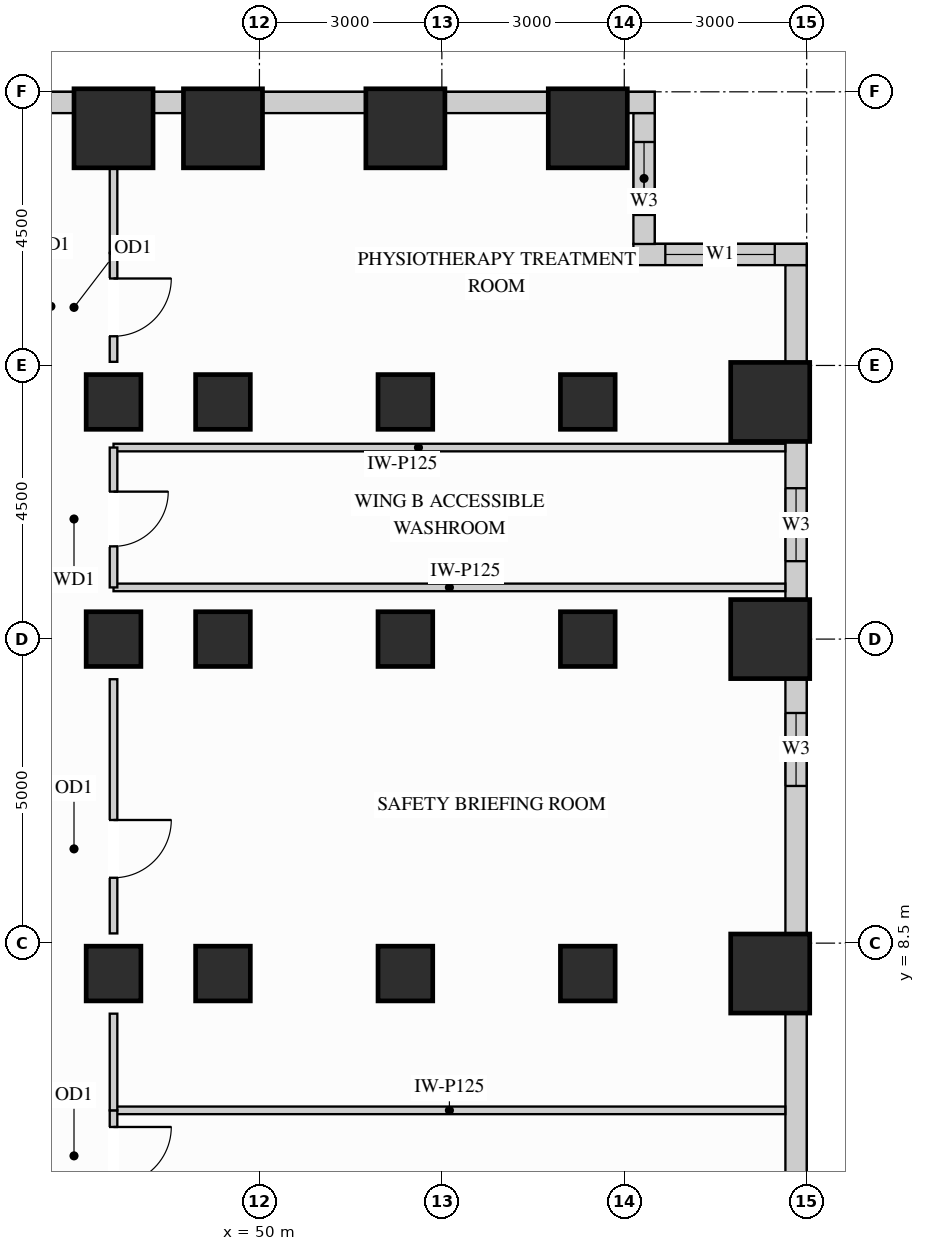
"""IFC4 building model, lengths in metres.
Left out: names, types, materials, properties, quantities, classifications, styles, units other than length and angle.
Written with IfcOpenShell. Run it as: python <this file> out.ifc"""

import sys

from ifc_helpers import new_model, si_unit, direction, frame, frame_2d, origin, origin_2d, place, context, subcontext, project, spatial, rectangle, extrude, source, transform, mapped, element, fill, save


model = new_model("IFC4")
c1 = context("Model", 3, precision=1e-05, world=origin(), true_north=direction((0.0, 1.0)))
c2 = subcontext(c1, "Body", "Model", "MODEL_VIEW")
j1 = project(units=[si_unit("LENGTHUNIT", "METRE"), si_unit("PLANEANGLEUNIT", "RADIAN")], contexts=[c1])
p1 = place(None, origin())
s1 = spatial("IfcSite", under=j1, at=p1, CompositionType="ELEMENT")
p2 = place(p1, origin())
s2 = spatial("IfcBuilding", under=s1, at=p2, CompositionType="ELEMENT")
p3 = place(p2, frame((0.0, 0.0, 33.3)))
s3 = spatial("IfcBuildingStorey", under=s2, at=p3, CompositionType="ELEMENT", Elevation=33.3)
m1 = source(origin(), c2, "Body", "SweptSolid", [
    extrude(rectangle(XDim=0.9, YDim=0.9, at=origin_2d()), origin(), (0.0, 0.0, 1.0), 3.38),
])
for number, where, z_axis, x_axis in (
    (1, (47.6, 13.5, 0.0), (0.0, 0.0, 1.0), (1.0, 0.0, 0.0)),
    (2, (47.6, 8.0, 0.0), (0.0, 0.0, 1.0), (1.0, 0.0, 0.0)),
    (3, (47.6, 17.4, 0.0), (0.0, 0.0, 1.0), (1.0, 0.0, 0.0)),
    (4, (49.4, 13.5, 0.0), (0.0, 0.0, 1.0), (1.0, 0.0, 0.0)),
    (5, (49.4, 17.4, 0.0), (0.0, 0.0, 1.0), (1.0, 0.0, 0.0)),
    (6, (49.4, 8.0, 0.0), (0.0, 0.0, 1.0), (1.0, 0.0, 0.0)),
    (7, (52.4, 13.5, 0.0), (0.0, 0.0, 1.0), (1.0, 0.0, 0.0)),
    (8, (52.4, 17.4, 0.0), (0.0, 0.0, 1.0), (1.0, 0.0, 0.0)),
    (9, (52.4, 8.0, 0.0), (0.0, 0.0, 1.0), (1.0, 0.0, 0.0)),
    (10, (55.4, 13.5, 0.0), (0.0, 0.0, 1.0), (1.0, 0.0, 0.0)),
    (11, (55.4, 17.4, 0.0), (0.0, 0.0, 1.0), (1.0, 0.0, 0.0)),
    (12, (55.4, 8.0, 0.0), (0.0, 0.0, 1.0), (1.0, 0.0, 0.0)),
):
    element("IfcColumn", number, at=place(p3, frame(where, z_axis=z_axis, x_axis=x_axis)), inside=s3, PredefinedType="COLUMN", context=c2, shape_type="MappedRepresentation", body=[
        mapped(m1, transform((0.0, 0.0, 0.0), x_axis=(1.0, 0.0, 0.0), y_axis=(0.0, 1.0, 0.0), z_axis=(0.0, 0.0, 1.0))),
    ])
m2 = source(origin(), c2, "Body", "SweptSolid", [
    extrude(rectangle(XDim=1.3, YDim=1.3, at=origin_2d()), origin(), (0.0, 0.0, 1.0), 3.38),
])
for number, where, z_axis, x_axis in (
    (13, (47.6, 21.9, 0.0), (0.0, 0.0, 1.0), (1.0, 0.0, 0.0)),
    (14, (49.4, 21.9, 0.0), (0.0, 0.0, 1.0), (1.0, 0.0, 0.0)),
    (15, (52.4, 21.9, 0.0), (0.0, 0.0, 1.0), (1.0, 0.0, 0.0)),
    (16, (55.4, 21.9, 0.0), (0.0, 0.0, 1.0), (1.0, 0.0, 0.0)),
    (17, (58.4, 13.5, 0.0), (0.0, 0.0, 1.0), (1.0, 0.0, 0.0)),
    (18, (58.4, 17.4, 0.0), (0.0, 0.0, 1.0), (1.0, 0.0, 0.0)),
    (19, (58.4, 8.0, 0.0), (0.0, 0.0, 1.0), (1.0, 0.0, 0.0)),
):
    element("IfcColumn", number, at=place(p3, frame(where, z_axis=z_axis, x_axis=x_axis)), inside=s3, PredefinedType="COLUMN", context=c2, shape_type="MappedRepresentation", body=[
        mapped(m2, transform((0.0, 0.0, 0.0), x_axis=(1.0, 0.0, 0.0), y_axis=(0.0, 1.0, 0.0), z_axis=(0.0, 0.0, 1.0))),
    ])
m3 = source(origin(), c2, "Body", "SweptSolid", [
    extrude(rectangle(XDim=3.204, YDim=0.35, at=frame_2d((1.602, 0.0))), origin(), (0.0, 0.0, 1.0), 2.51),
])
p4 = place(p3, frame((58.825, 4.148, 0.0), z_axis=(0.0, 0.0, 1.0), x_axis=(0.0, 1.0, 0.0)))
e20 = element("IfcWall", 20, at=p4, inside=s3, PredefinedType="SOLIDWALL", context=c2, shape_type="MappedRepresentation", body=[
    mapped(m3, transform((0.0, 0.0, 0.0), x_axis=(1.0, 0.0, 0.0), y_axis=(0.0, 1.0, 0.0), z_axis=(0.0, 0.0, 1.0))),
])
p5 = place(p3, frame((58.825, 8.648, 0.0), z_axis=(0.0, 0.0, 1.0), x_axis=(0.0, 1.0, 0.0)))
e21 = element("IfcWall", 21, at=p5, inside=s3, PredefinedType="SOLIDWALL", context=c2, shape_type="SweptSolid", body=[
    extrude(rectangle(XDim=4.204, YDim=0.35, at=frame_2d((2.102, 0.0))), origin(), (0.0, 0.0, 1.0), 2.51),
])
p6 = place(p5, frame((2.437, 0.0, 0.78)))
e22 = element("IfcOpeningElement", 22, at=p6, cuts=e21, PredefinedType="OPENING", context=c2, shape_type="SweptSolid", body=[
    extrude(rectangle(XDim=1.2, YDim=1.55, at=frame_2d((0.6, 0.775))), frame((0.0, 0.185, 0.0), z_axis=(0.0, -1.0, 0.0), x_axis=(1.0, 0.0, 0.0)), (0.0, 0.0, 1.0), 0.37),
])
p7 = place(p3, frame((58.825, 14.148, 0.0), z_axis=(0.0, 0.0, 1.0), x_axis=(0.0, 1.0, 0.0)))
e23 = element("IfcWall", 23, at=p7, inside=s3, PredefinedType="SOLIDWALL", context=c2, shape_type="SweptSolid", body=[
    extrude(rectangle(XDim=2.604, YDim=0.35, at=frame_2d((1.302, 0.0))), origin(), (0.0, 0.0, 1.0), 2.51),
])
p8 = place(p7, frame((0.633, 0.0, 0.78)))
e24 = element("IfcOpeningElement", 24, at=p8, cuts=e23, PredefinedType="OPENING", context=c2, shape_type="SweptSolid", body=[
    extrude(rectangle(XDim=1.2, YDim=1.55, at=frame_2d((0.6, 0.775))), frame((0.0, 0.185, 0.0), z_axis=(0.0, -1.0, 0.0), x_axis=(1.0, 0.0, 0.0)), (0.0, 0.0, 1.0), 0.37),
])
m4 = source(origin(), c2, "Body", "SweptSolid", [
    extrude(rectangle(XDim=1.604, YDim=0.35, at=frame_2d((0.802, 0.0))), origin(), (0.0, 0.0, 1.0), 3.365),
])
p9 = place(p3, frame((58.825, 18.048, 0.0), z_axis=(0.0, 0.0, 1.0), x_axis=(0.0, 1.0, 0.0)))
e25 = element("IfcWall", 25, at=p9, inside=s3, PredefinedType="SOLIDWALL", context=c2, shape_type="MappedRepresentation", body=[
    mapped(m4, transform((0.0, 0.0, 0.0), x_axis=(1.0, 0.0, 0.0), y_axis=(0.0, 1.0, 0.0), z_axis=(0.0, 0.0, 1.0))),
])
p10 = place(p3, frame((59.0, 19.825, 0.0), z_axis=(0.0, 0.0, 1.0), x_axis=(-1.0, 0.0, 0.0)))
e26 = element("IfcWall", 26, at=p10, inside=s3, PredefinedType="SOLIDWALL", context=c2, shape_type="SweptSolid", body=[
    extrude(rectangle(XDim=2.85, YDim=0.35, at=frame_2d((1.425, 0.0))), origin(), (0.0, 0.0, 1.0), 3.365),
])
p11 = place(p10, frame((0.525, 0.0, 0.78)))
e27 = element("IfcOpeningElement", 27, at=p11, cuts=e26, PredefinedType="OPENING", context=c2, shape_type="SweptSolid", body=[
    extrude(rectangle(XDim=1.8, YDim=2.1, at=frame_2d((0.9, 1.05))), frame((0.0, 0.185, 0.0), z_axis=(0.0, -1.0, 0.0), x_axis=(1.0, 0.0, 0.0)), (0.0, 0.0, 1.0), 0.37),
])
p12 = place(p3, frame((56.325, 19.998, 0.0), z_axis=(0.0, 0.0, 1.0), x_axis=(0.0, 1.0, 0.0)))
e28 = element("IfcWall", 28, at=p12, inside=s3, PredefinedType="SOLIDWALL", context=c2, shape_type="SweptSolid", body=[
    extrude(rectangle(XDim=2.154, YDim=0.35, at=frame_2d((1.077, 0.0))), origin(), (0.0, 0.0, 1.0), 3.365),
])
p13 = place(p12, frame((0.477, 0.0, 0.78)))
e29 = element("IfcOpeningElement", 29, at=p13, cuts=e28, PredefinedType="OPENING", context=c2, shape_type="SweptSolid", body=[
    extrude(rectangle(XDim=1.2, YDim=2.1, at=frame_2d((0.6, 1.05))), frame((0.0, 0.185, 0.0), z_axis=(0.0, -1.0, 0.0), x_axis=(1.0, 0.0, 0.0)), (0.0, 0.0, 1.0), 0.37),
])
m5 = source(origin(), c2, "Body", "SweptSolid", [
    extrude(rectangle(XDim=0.452, YDim=0.35, at=frame_2d((0.226, 0.0))), origin(), (0.0, 0.0, 1.0), 3.365),
])
p14 = place(p3, frame((56.5, 22.325, 0.0), z_axis=(0.0, 0.0, 1.0), x_axis=(-1.0, 0.0, 0.0)))
e30 = element("IfcWall", 30, at=p14, inside=s3, PredefinedType="SOLIDWALL", context=c2, shape_type="MappedRepresentation", body=[
    mapped(m5, transform((0.0, 0.0, 0.0), x_axis=(1.0, 0.0, 0.0), y_axis=(0.0, 1.0, 0.0), z_axis=(0.0, 0.0, 1.0))),
])
m6 = source(origin(), c2, "Body", "SweptSolid", [
    extrude(rectangle(XDim=1.704, YDim=0.35, at=frame_2d((0.852, 0.0))), origin(), (0.0, 0.0, 1.0), 2.51),
])
for number, where, z_axis, x_axis in (
    (31, (54.752, 22.325, 0.0), (0.0, 0.0, 1.0), (-1.0, 0.0, 0.0)),
    (32, (51.752, 22.325, 0.0), (0.0, 0.0, 1.0), (-1.0, 0.0, 0.0)),
):
    element("IfcWall", number, at=place(p3, frame(where, z_axis=z_axis, x_axis=x_axis)), inside=s3, PredefinedType="SOLIDWALL", context=c2, shape_type="MappedRepresentation", body=[
        mapped(m6, transform((0.0, 0.0, 0.0), x_axis=(1.0, 0.0, 0.0), y_axis=(0.0, 1.0, 0.0), z_axis=(0.0, 0.0, 1.0))),
    ])
m7 = source(origin(), c2, "Body", "SweptSolid", [
    extrude(rectangle(XDim=0.504, YDim=0.35, at=frame_2d((0.252, 0.0))), origin(), (0.0, 0.0, 1.0), 3.365),
])
p15 = place(p3, frame((48.752, 22.325, 0.0), z_axis=(0.0, 0.0, 1.0), x_axis=(-1.0, 0.0, 0.0)))
e33 = element("IfcWall", 33, at=p15, inside=s3, PredefinedType="SOLIDWALL", context=c2, shape_type="MappedRepresentation", body=[
    mapped(m7, transform((0.0, 0.0, 0.0), x_axis=(1.0, 0.0, 0.0), y_axis=(0.0, 1.0, 0.0), z_axis=(0.0, 0.0, 1.0))),
])
p16 = place(p3, frame((46.952, 22.325, 0.0), z_axis=(0.0, 0.0, 1.0), x_axis=(-1.0, 0.0, 0.0)))
e34 = element("IfcWall", 34, at=p16, inside=s3, PredefinedType="SOLIDWALL", context=c2, shape_type="SweptSolid", body=[
    extrude(rectangle(XDim=6.304, YDim=0.35, at=frame_2d((3.152, 0.0))), origin(), (0.0, 0.0, 1.0), 2.51),
])
p17 = place(p16, frame((1.649, 0.0, 0.78)))
e35 = element("IfcOpeningElement", 35, at=p17, cuts=e34, PredefinedType="OPENING", context=c2, shape_type="SweptSolid", body=[
    extrude(rectangle(XDim=1.8, YDim=1.55, at=frame_2d((0.9, 0.775))), frame((0.0, 0.185, 0.0), z_axis=(0.0, -1.0, 0.0), x_axis=(1.0, 0.0, 0.0)), (0.0, 0.0, 1.0), 0.37),
])
p18 = place(p16, frame((3.817, 0.0, 0.78)))
e36 = element("IfcOpeningElement", 36, at=p18, cuts=e34, PredefinedType="OPENING", context=c2, shape_type="SweptSolid", body=[
    extrude(rectangle(XDim=1.8, YDim=1.55, at=frame_2d((0.9, 0.775))), frame((0.0, 0.185, 0.0), z_axis=(0.0, -1.0, 0.0), x_axis=(1.0, 0.0, 0.0)), (0.0, 0.0, 1.0), 0.37),
])
m8 = source(origin(), c2, "Body", "SweptSolid", [
    extrude(rectangle(XDim=11.048, YDim=0.125, at=frame_2d((5.524, 0.0))), origin(), (0.0, 0.0, 1.0), 3.365),
])
p19 = place(p3, frame((47.6, 14.35, 0.0), z_axis=(0.0, 0.0, 1.0), x_axis=(1.0, 0.0, 0.0)))
e37 = element("IfcWall", 37, at=p19, inside=s3, PredefinedType="PARTITIONING", context=c2, shape_type="MappedRepresentation", body=[
    mapped(m8, transform((0.0, 0.0, 0.0), x_axis=(1.0, 0.0, 0.0), y_axis=(0.0, 1.0, 0.0), z_axis=(0.0, 0.0, 1.0))),
])
m9 = source(origin(), c2, "Body", "SweptSolid", [
    extrude(rectangle(XDim=11.048, YDim=0.125, at=frame_2d((5.524, 0.0))), origin(), (0.0, 0.0, 1.0), 2.67),
])
p20 = place(p3, frame((47.6, 16.65, 0.0), z_axis=(0.0, 0.0, 1.0), x_axis=(1.0, 0.0, 0.0)))
e38 = element("IfcWall", 38, at=p20, inside=s3, PredefinedType="PARTITIONING", context=c2, shape_type="MappedRepresentation", body=[
    mapped(m9, transform((0.0, 0.0, 0.0), x_axis=(1.0, 0.0, 0.0), y_axis=(0.0, 1.0, 0.0), z_axis=(0.0, 0.0, 1.0))),
])
p21 = place(p3, frame((47.6, 5.75, 0.0), z_axis=(0.0, 0.0, 1.0), x_axis=(1.0, 0.0, 0.0)))
e39 = element("IfcWall", 39, at=p21, inside=s3, PredefinedType="PARTITIONING", context=c2, shape_type="MappedRepresentation", body=[
    mapped(m8, transform((0.0, 0.0, 0.0), x_axis=(1.0, 0.0, 0.0), y_axis=(0.0, 1.0, 0.0), z_axis=(0.0, 0.0, 1.0))),
])
p22 = place(p3, frame((47.6, 4.16, 0.0), z_axis=(0.0, 0.0, 1.0), x_axis=(0.0, 1.0, 0.0)))
e40 = element("IfcWall", 40, at=p22, inside=s3, PredefinedType="PARTITIONING", context=c2, shape_type="SweptSolid", body=[
    extrude(rectangle(XDim=1.59, YDim=0.125, at=frame_2d((0.795, 0.0))), origin(), (0.0, 0.0, 1.0), 2.67),
])
p23 = place(p22, frame((0.367, 0.0, 0.0)))
e41 = element("IfcOpeningElement", 41, at=p23, cuts=e40, PredefinedType="OPENING", context=c2, shape_type="SweptSolid", body=[
    extrude(rectangle(XDim=0.95, YDim=2.15, at=frame_2d((0.475, 1.075))), frame((0.0, 0.073, 0.0), z_axis=(0.0, -1.0, 0.0), x_axis=(1.0, 0.0, 0.0)), (0.0, 0.0, 1.0), 0.145),
])
m10 = source(origin(), c2, "Body", "SweptSolid", [
    extrude(rectangle(XDim=1.59, YDim=0.125, at=frame_2d((0.795, 0.0))), origin(), (0.0, 0.0, 1.0), 2.67),
])
p24 = place(p3, frame((47.6, 5.75, 0.0), z_axis=(0.0, 0.0, 1.0), x_axis=(0.0, 1.0, 0.0)))
e42 = element("IfcWall", 42, at=p24, inside=s3, PredefinedType="PARTITIONING", context=c2, shape_type="MappedRepresentation", body=[
    mapped(m10, transform((0.0, 0.0, 0.0), x_axis=(1.0, 0.0, 0.0), y_axis=(0.0, 1.0, 0.0), z_axis=(0.0, 0.0, 1.0))),
])
p25 = place(p3, frame((47.6, 8.66, 0.0), z_axis=(0.0, 0.0, 1.0), x_axis=(0.0, 1.0, 0.0)))
e43 = element("IfcWall", 43, at=p25, inside=s3, PredefinedType="PARTITIONING", context=c2, shape_type="SweptSolid", body=[
    extrude(rectangle(XDim=4.18, YDim=0.125, at=frame_2d((2.09, 0.0))), origin(), (0.0, 0.0, 1.0), 2.67),
])
p26 = place(p25, frame((0.915, 0.0, 0.0)))
e44 = element("IfcOpeningElement", 44, at=p26, cuts=e43, PredefinedType="OPENING", context=c2, shape_type="SweptSolid", body=[
    extrude(rectangle(XDim=0.95, YDim=2.15, at=frame_2d((0.475, 1.075))), frame((0.0, 0.073, 0.0), z_axis=(0.0, -1.0, 0.0), x_axis=(1.0, 0.0, 0.0)), (0.0, 0.0, 1.0), 0.145),
])
p27 = place(p3, frame((47.6, 18.06, 0.0), z_axis=(0.0, 0.0, 1.0), x_axis=(0.0, 1.0, 0.0)))
e45 = element("IfcWall", 45, at=p27, inside=s3, PredefinedType="PARTITIONING", context=c2, shape_type="SweptSolid", body=[
    extrude(rectangle(XDim=1.79, YDim=0.125, at=frame_2d((0.895, 0.0))), origin(), (0.0, 0.0, 1.0), 2.67),
])
p28 = place(p27, frame((0.42, 0.0, 0.0)))
e46 = element("IfcOpeningElement", 46, at=p28, cuts=e45, PredefinedType="OPENING", context=c2, shape_type="SweptSolid", body=[
    extrude(rectangle(XDim=0.95, YDim=2.15, at=frame_2d((0.475, 1.075))), frame((0.0, 0.073, 0.0), z_axis=(0.0, -1.0, 0.0), x_axis=(1.0, 0.0, 0.0)), (0.0, 0.0, 1.0), 0.145),
])
m11 = source(origin(), c2, "Body", "SweptSolid", [
    extrude(rectangle(XDim=1.39, YDim=0.125, at=frame_2d((0.695, 0.0))), origin(), (0.0, 0.0, 1.0), 2.67),
])
p29 = place(p3, frame((47.6, 19.85, 0.0), z_axis=(0.0, 0.0, 1.0), x_axis=(0.0, 1.0, 0.0)))
e47 = element("IfcWall", 47, at=p29, inside=s3, PredefinedType="PARTITIONING", context=c2, shape_type="MappedRepresentation", body=[
    mapped(m11, transform((0.0, 0.0, 0.0), x_axis=(1.0, 0.0, 0.0), y_axis=(0.0, 1.0, 0.0), z_axis=(0.0, 0.0, 1.0))),
])
p30 = place(p3, frame((47.6, 14.35, 0.0), z_axis=(0.0, 0.0, 1.0), x_axis=(0.0, 1.0, 0.0)))
e48 = element("IfcWall", 48, at=p30, inside=s3, PredefinedType="PARTITIONING", context=c2, shape_type="SweptSolid", body=[
    extrude(rectangle(XDim=2.3, YDim=0.125, at=frame_2d((1.15, 0.0))), origin(), (0.0, 0.0, 1.0), 2.67),
])
p31 = place(p30, frame((0.675, 0.0, 0.0)))
e49 = element("IfcOpeningElement", 49, at=p31, cuts=e48, PredefinedType="OPENING", context=c2, shape_type="SweptSolid", body=[
    extrude(rectangle(XDim=0.9, YDim=2.15, at=frame_2d((0.45, 1.075))), frame((0.0, 0.073, 0.0), z_axis=(0.0, -1.0, 0.0), x_axis=(1.0, 0.0, 0.0)), (0.0, 0.0, 1.0), 0.145),
])
m12 = source(origin(), c2, "Body", "SweptSolid", [
    extrude(rectangle(XDim=0.95, YDim=2.15, at=frame_2d((0.475, 1.075))), frame((0.0, 0.025, 0.0), z_axis=(0.0, -1.0, 0.0), x_axis=(1.0, 0.0, 0.0)), (0.0, 0.0, 1.0), 0.05),
])
p32 = place(p23, origin())
e50 = element("IfcDoor", 50, at=p32, inside=s3, OperationType="SINGLE_SWING_RIGHT", PredefinedType="DOOR", context=c2, shape_type="MappedRepresentation", body=[
    mapped(m12, transform((0.0, 0.0, 0.0), x_axis=(1.0, 0.0, 0.0), y_axis=(0.0, 1.0, 0.0), z_axis=(0.0, 0.0, 1.0))),
])
fill(e41, e50)
p33 = place(p26, origin())
e51 = element("IfcDoor", 51, at=p33, inside=s3, OperationType="SINGLE_SWING_RIGHT", PredefinedType="DOOR", context=c2, shape_type="MappedRepresentation", body=[
    mapped(m12, transform((0.0, 0.0, 0.0), x_axis=(1.0, 0.0, 0.0), y_axis=(0.0, 1.0, 0.0), z_axis=(0.0, 0.0, 1.0))),
])
fill(e44, e51)
p34 = place(p28, origin())
e52 = element("IfcDoor", 52, at=p34, inside=s3, OperationType="SINGLE_SWING_RIGHT", PredefinedType="DOOR", context=c2, shape_type="MappedRepresentation", body=[
    mapped(m12, transform((0.0, 0.0, 0.0), x_axis=(1.0, 0.0, 0.0), y_axis=(0.0, 1.0, 0.0), z_axis=(0.0, 0.0, 1.0))),
])
fill(e46, e52)
m13 = source(origin(), c2, "Body", "SweptSolid", [
    extrude(rectangle(XDim=0.9, YDim=2.15, at=frame_2d((0.45, 1.075))), frame((0.0, 0.025, 0.0), z_axis=(0.0, -1.0, 0.0), x_axis=(1.0, 0.0, 0.0)), (0.0, 0.0, 1.0), 0.05),
])
p35 = place(p31, origin())
e53 = element("IfcDoor", 53, at=p35, inside=s3, OperationType="SINGLE_SWING_RIGHT", PredefinedType="DOOR", context=c2, shape_type="MappedRepresentation", body=[
    mapped(m13, transform((0.0, 0.0, 0.0), x_axis=(1.0, 0.0, 0.0), y_axis=(0.0, 1.0, 0.0), z_axis=(0.0, 0.0, 1.0))),
])
fill(e49, e53)
m14 = source(origin(), c2, "Body", "SweptSolid", [
    extrude(rectangle(XDim=1.8, YDim=2.1, at=frame_2d((0.9, 1.05))), frame((0.0, 0.03, 0.0), z_axis=(0.0, -1.0, 0.0), x_axis=(1.0, 0.0, 0.0)), (0.0, 0.0, 1.0), 0.06),
])
p36 = place(p11, origin())
e54 = element("IfcWindow", 54, at=p36, inside=s3, PartitioningType="SINGLE_PANEL", PredefinedType="WINDOW", context=c2, shape_type="MappedRepresentation", body=[
    mapped(m14, transform((0.0, 0.0, 0.0), x_axis=(1.0, 0.0, 0.0), y_axis=(0.0, 1.0, 0.0), z_axis=(0.0, 0.0, 1.0))),
])
fill(e27, e54)
m15 = source(origin(), c2, "Body", "SweptSolid", [
    extrude(rectangle(XDim=1.2, YDim=1.55, at=frame_2d((0.6, 0.775))), frame((0.0, 0.03, 0.0), z_axis=(0.0, -1.0, 0.0), x_axis=(1.0, 0.0, 0.0)), (0.0, 0.0, 1.0), 0.06),
])
p37 = place(p6, origin())
e55 = element("IfcWindow", 55, at=p37, inside=s3, PartitioningType="SINGLE_PANEL", PredefinedType="WINDOW", context=c2, shape_type="MappedRepresentation", body=[
    mapped(m15, transform((0.0, 0.0, 0.0), x_axis=(1.0, 0.0, 0.0), y_axis=(0.0, 1.0, 0.0), z_axis=(0.0, 0.0, 1.0))),
])
fill(e22, e55)
p38 = place(p8, origin())
e56 = element("IfcWindow", 56, at=p38, inside=s3, PartitioningType="SINGLE_PANEL", PredefinedType="WINDOW", context=c2, shape_type="MappedRepresentation", body=[
    mapped(m15, transform((0.0, 0.0, 0.0), x_axis=(1.0, 0.0, 0.0), y_axis=(0.0, 1.0, 0.0), z_axis=(0.0, 0.0, 1.0))),
])
fill(e24, e56)
m16 = source(origin(), c2, "Body", "SweptSolid", [
    extrude(rectangle(XDim=1.2, YDim=2.1, at=frame_2d((0.6, 1.05))), frame((0.0, 0.03, 0.0), z_axis=(0.0, -1.0, 0.0), x_axis=(1.0, 0.0, 0.0)), (0.0, 0.0, 1.0), 0.06),
])
p39 = place(p13, origin())
e57 = element("IfcWindow", 57, at=p39, inside=s3, PartitioningType="SINGLE_PANEL", PredefinedType="WINDOW", context=c2, shape_type="MappedRepresentation", body=[
    mapped(m16, transform((0.0, 0.0, 0.0), x_axis=(1.0, 0.0, 0.0), y_axis=(0.0, 1.0, 0.0), z_axis=(0.0, 0.0, 1.0))),
])
fill(e29, e57)
save(model, sys.argv[1])
